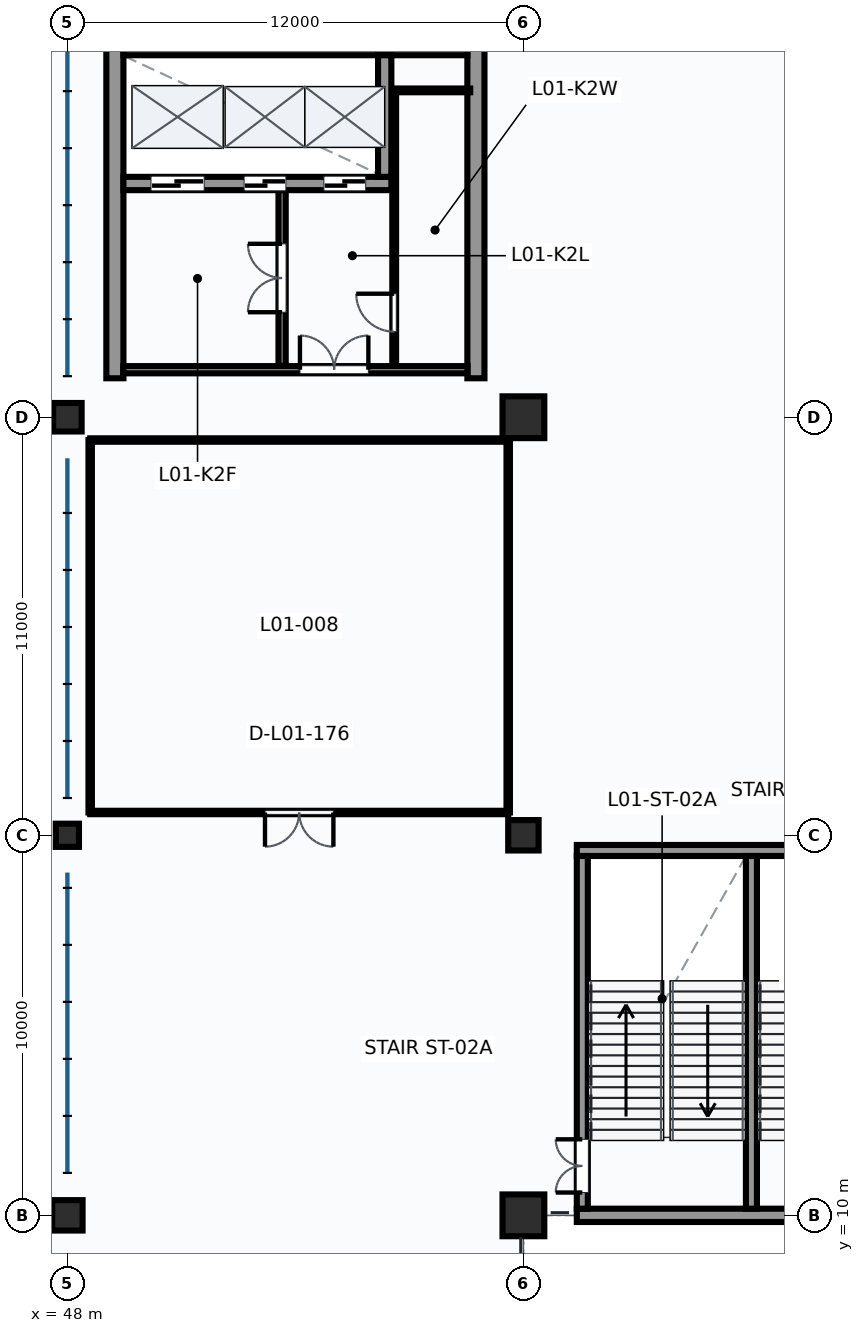
"""IFC4 building model, lengths in metres.
Left out: names, types, materials, properties, quantities, classifications, styles, units other than length and angle.
Written with IfcOpenShell. Run it as: python <this file> out.ifc"""

import sys

from ifc_helpers import new_model, si_unit, direction, frame, frame_2d, origin, origin_2d, place, context, subcontext, project, spatial, rectangle, circle, hollow_circle, extrude, element, fill, save


model = new_model("IFC4")
c1 = context("Model", 3, precision=1e-05, world=origin(), true_north=direction((0.0, 1.0)))
c2 = subcontext(c1, "Body", "Model", "MODEL_VIEW")
j1 = project(units=[si_unit("LENGTHUNIT", "METRE"), si_unit("PLANEANGLEUNIT", "RADIAN")], contexts=[c1])
p1 = place(None, origin())
s1 = spatial("IfcSite", under=j1, at=p1, CompositionType="ELEMENT")
p2 = place(p1, origin())
s2 = spatial("IfcBuilding", under=s1, at=p2, CompositionType="ELEMENT")
p3 = place(p2, frame((0.0, 0.0, 5.4)))
s3 = spatial("IfcBuildingStorey", under=s2, at=p3, CompositionType="ELEMENT", Elevation=5.4)
p4 = place(p3, frame((48.0, 10.0, 0.0), z_axis=(0.0, 0.0, 1.0), x_axis=(1.0, 0.0, 0.0)))
e1 = element("IfcColumn", 1, at=p4, inside=s3, PredefinedType="COLUMN", context=c2, shape_type="SweptSolid", body=[
    extrude(rectangle(XDim=0.8, YDim=0.8, at=origin_2d()), origin(), (0.0, 0.0, 1.0), 4.8),
])
p5 = place(p3, frame((48.0, 20.0, 0.0), z_axis=(0.0, 0.0, 1.0), x_axis=(1.0, 0.0, 0.0)))
e2 = element("IfcColumn", 2, at=p5, inside=s3, PredefinedType="COLUMN", context=c2, shape_type="SweptSolid", body=[
    extrude(hollow_circle(Radius=0.305, WallThickness=0.025, at=origin_2d()), origin(), (0.0, 0.0, 1.0), 4.8),
])
p6 = place(p3, frame((48.0, 31.0, 0.0), z_axis=(0.0, 0.0, 1.0), x_axis=(1.0, 0.0, 0.0)))
e3 = element("IfcColumn", 3, at=p6, inside=s3, PredefinedType="COLUMN", context=c2, shape_type="SweptSolid", body=[
    extrude(rectangle(XDim=0.75, YDim=0.75, at=origin_2d()), origin(), (0.0, 0.0, 1.0), 4.8),
])
p7 = place(p3, frame((60.0, 10.0, 0.0), z_axis=(0.0, 0.0, 1.0), x_axis=(1.0, 0.0, 0.0)))
e4 = element("IfcColumn", 4, at=p7, inside=s3, PredefinedType="COLUMN", context=c2, shape_type="SweptSolid", body=[
    extrude(rectangle(XDim=1.1, YDim=1.1, at=origin_2d()), origin(), (0.0, 0.0, 1.0), 4.8),
])
p8 = place(p3, frame((60.0, 20.0, 0.0), z_axis=(0.0, 0.0, 1.0), x_axis=(1.0, 0.0, 0.0)))
e5 = element("IfcColumn", 5, at=p8, inside=s3, PredefinedType="COLUMN", context=c2, shape_type="SweptSolid", body=[
    extrude(circle(Radius=0.4, at=origin_2d()), origin(), (0.0, 0.0, 1.0), 4.8),
])
p9 = place(p3, frame((60.0, 31.0, 0.0), z_axis=(0.0, 0.0, 1.0), x_axis=(1.0, 0.0, 0.0)))
e6 = element("IfcColumn", 6, at=p9, inside=s3, PredefinedType="COLUMN", context=c2, shape_type="SweptSolid", body=[
    extrude(rectangle(XDim=1.1, YDim=1.1, at=origin_2d()), origin(), (0.0, 0.0, 1.0), 4.8),
])
p10 = place(p3, frame((61.405, 10.0, 0.0), z_axis=(0.0, 0.0, 1.0), x_axis=(1.0, 0.0, 0.0)))
e7 = element("IfcWall", 7, at=p10, inside=s3, PredefinedType="SHEAR", context=c2, shape_type="SweptSolid", body=[
    extrude(rectangle(XDim=9.19, YDim=0.35, at=frame_2d((4.595, 0.0))), origin(), (0.0, 0.0, 1.0), 3.757),
])
p11 = place(p3, frame((61.405, 19.6, 0.0), z_axis=(0.0, 0.0, 1.0), x_axis=(1.0, 0.0, 0.0)))
e8 = element("IfcWall", 8, at=p11, inside=s3, PredefinedType="SHEAR", context=c2, shape_type="SweptSolid", body=[
    extrude(rectangle(XDim=9.19, YDim=0.29, at=frame_2d((4.595, 0.0))), origin(), (0.0, 0.0, 1.0), 4.8),
])
p12 = place(p3, frame((61.55, 10.175, 0.0), z_axis=(0.0, 0.0, 1.0), x_axis=(0.0, 1.0, 0.0)))
e9 = element("IfcWall", 9, at=p12, inside=s3, PredefinedType="SHEAR", context=c2, shape_type="SweptSolid", body=[
    extrude(rectangle(XDim=9.28, YDim=0.29, at=frame_2d((4.64, 0.0))), origin(), (0.0, 0.0, 1.0), 4.8),
])
p13 = place(p12, frame((0.425, 0.0, 0.0)))
e10 = element("IfcOpeningElement", 10, at=p13, cuts=e9, PredefinedType="OPENING", context=c2, shape_type="SweptSolid", body=[
    extrude(rectangle(XDim=1.4, YDim=2.2, at=frame_2d((0.7, 1.1))), frame((0.0, 0.155, 0.0), z_axis=(0.0, -1.0, 0.0), x_axis=(1.0, 0.0, 0.0)), (0.0, 0.0, 1.0), 0.31),
])
p14 = place(p3, frame((66.0, 10.175, 0.0), z_axis=(0.0, 0.0, 1.0), x_axis=(0.0, 1.0, 0.0)))
e11 = element("IfcWall", 11, at=p14, inside=s3, PredefinedType="SHEAR", context=c2, shape_type="SweptSolid", body=[
    extrude(rectangle(XDim=9.28, YDim=0.29, at=frame_2d((4.64, 0.0))), origin(), (0.0, 0.0, 1.0), 4.8),
])
for number, where, z_axis, x_axis in (
    (12, (49.25, 32.025, 0.0), (0.0, 0.0, 1.0), (0.0, 1.0, 0.0)),
    (13, (58.75, 32.025, 0.0), (0.0, 0.0, 1.0), (0.0, 1.0, 0.0)),
):
    element("IfcWall", number, at=place(p3, frame(where, z_axis=z_axis, x_axis=x_axis)), inside=s3, PredefinedType="SHEAR", context=c2, shape_type="SweptSolid", body=[
        extrude(rectangle(XDim=8.95, YDim=0.45, at=frame_2d((4.475, 0.0))), origin(), (0.0, 0.0, 1.0), 4.8),
    ])
p15 = place(p3, frame((49.475, 40.75, 0.0), z_axis=(0.0, 0.0, 1.0), x_axis=(1.0, 0.0, 0.0)))
e14 = element("IfcWall", 14, at=p15, inside=s3, PredefinedType="SHEAR", context=c2, shape_type="SweptSolid", body=[
    extrude(rectangle(XDim=9.05, YDim=0.45, at=frame_2d((4.525, 0.0))), origin(), (0.0, 0.0, 1.0), 4.8),
])
p16 = place(p3, frame((49.475, 37.15, 0.0), z_axis=(0.0, 0.0, 1.0), x_axis=(1.0, 0.0, 0.0)))
e15 = element("IfcWall", 15, at=p16, inside=s3, PredefinedType="SHEAR", context=c2, shape_type="SweptSolid", body=[
    extrude(rectangle(XDim=7.05, YDim=0.35, at=frame_2d((3.525, 0.0))), origin(), (0.0, 0.0, 1.0), 4.8),
])
p17 = place(p16, frame((0.725, 0.0, 0.0)))
e16 = element("IfcOpeningElement", 16, at=p17, cuts=e15, PredefinedType="OPENING", context=c2, shape_type="SweptSolid", body=[
    extrude(rectangle(XDim=1.4, YDim=2.3, at=frame_2d((0.7, 1.15))), frame((0.0, 0.185, 0.0), z_axis=(0.0, -1.0, 0.0), x_axis=(1.0, 0.0, 0.0)), (0.0, 0.0, 1.0), 0.37),
])
p18 = place(p16, frame((3.175, 0.0, 0.0)))
e17 = element("IfcOpeningElement", 17, at=p18, cuts=e15, PredefinedType="OPENING", context=c2, shape_type="SweptSolid", body=[
    extrude(rectangle(XDim=1.1, YDim=2.2, at=frame_2d((0.55, 1.1))), frame((0.0, 0.185, 0.0), z_axis=(0.0, -1.0, 0.0), x_axis=(1.0, 0.0, 0.0)), (0.0, 0.0, 1.0), 0.37),
])
p19 = place(p16, frame((5.275, 0.0, 0.0)))
e18 = element("IfcOpeningElement", 18, at=p19, cuts=e15, PredefinedType="OPENING", context=c2, shape_type="SweptSolid", body=[
    extrude(rectangle(XDim=1.1, YDim=2.2, at=frame_2d((0.55, 1.1))), frame((0.0, 0.185, 0.0), z_axis=(0.0, -1.0, 0.0), x_axis=(1.0, 0.0, 0.0)), (0.0, 0.0, 1.0), 0.37),
])
p20 = place(p3, frame((56.35, 37.325, 0.0), z_axis=(0.0, 0.0, 1.0), x_axis=(0.0, 1.0, 0.0)))
e19 = element("IfcWall", 19, at=p20, inside=s3, PredefinedType="SHEAR", context=c2, shape_type="SweptSolid", body=[
    extrude(rectangle(XDim=3.2, YDim=0.35, at=frame_2d((1.6, 0.0))), origin(), (0.0, 0.0, 1.0), 4.8),
])
p21 = place(p3, frame((49.47, 32.25, 0.0), z_axis=(0.0, 0.0, 1.0), x_axis=(1.0, 0.0, 0.0)))
e20 = element("IfcWall", 20, at=p21, inside=s3, PredefinedType="PARTITIONING", context=c2, shape_type="SweptSolid", body=[
    extrude(rectangle(XDim=9.06, YDim=0.19, at=frame_2d((4.53, 0.0))), origin(), (0.0, 0.0, 1.0), 4.47),
])
p22 = place(p21, frame((4.65, 0.0, 0.0)))
e21 = element("IfcOpeningElement", 21, at=p22, cuts=e20, PredefinedType="OPENING", context=c2, shape_type="SweptSolid", body=[
    extrude(rectangle(XDim=1.8, YDim=2.3, at=frame_2d((0.9, 1.15))), frame((0.0, 0.105, 0.0), z_axis=(0.0, -1.0, 0.0), x_axis=(1.0, 0.0, 0.0)), (0.0, 0.0, 1.0), 0.21),
])
p23 = place(p3, frame((53.65, 32.35, 0.0), z_axis=(0.0, 0.0, 1.0), x_axis=(0.0, 1.0, 0.0)))
e22 = element("IfcWall", 22, at=p23, inside=s3, PredefinedType="PARTITIONING", context=c2, shape_type="SweptSolid", body=[
    extrude(rectangle(XDim=4.625, YDim=0.19, at=frame_2d((2.312, 0.0))), origin(), (0.0, 0.0, 1.0), 4.47),
])
p24 = place(p23, frame((1.413, 0.0, 0.0)))
e23 = element("IfcOpeningElement", 23, at=p24, cuts=e22, PredefinedType="OPENING", context=c2, shape_type="SweptSolid", body=[
    extrude(rectangle(XDim=1.8, YDim=2.2, at=frame_2d((0.9, 1.1))), frame((0.0, 0.105, 0.0), z_axis=(0.0, -1.0, 0.0), x_axis=(1.0, 0.0, 0.0)), (0.0, 0.0, 1.0), 0.21),
])
p25 = place(p3, frame((56.6, 32.35, 0.0), z_axis=(0.0, 0.0, 1.0), x_axis=(0.0, 1.0, 0.0)))
e24 = element("IfcWall", 24, at=p25, inside=s3, PredefinedType="PARTITIONING", context=c2, shape_type="SweptSolid", body=[
    extrude(rectangle(XDim=7.25, YDim=0.1, at=frame_2d((3.625, 0.0))), origin(), (0.0, 0.0, 1.0), 4.47),
])
p26 = place(p25, frame((0.9, 0.0, 0.0)))
e25 = element("IfcOpeningElement", 25, at=p26, cuts=e24, PredefinedType="OPENING", context=c2, shape_type="SweptSolid", body=[
    extrude(rectangle(XDim=1.0, YDim=2.1, at=frame_2d((0.5, 1.05))), frame((0.0, 0.06, 0.0), z_axis=(0.0, -1.0, 0.0), x_axis=(1.0, 0.0, 0.0)), (0.0, 0.0, 1.0), 0.12),
])
p27 = place(p3, frame((56.6, 39.6, 0.0), z_axis=(0.0, 0.0, 1.0), x_axis=(1.0, 0.0, 0.0)))
e26 = element("IfcWall", 26, at=p27, inside=s3, PredefinedType="PARTITIONING", context=c2, shape_type="SweptSolid", body=[
    extrude(rectangle(XDim=2.0, YDim=0.1, at=frame_2d((1.0, 0.0))), origin(), (0.0, 0.0, 1.0), 4.47),
])
p28 = place(p3, frame((59.6, 30.4, 0.0), z_axis=(0.0, 0.0, 1.0), x_axis=(0.0, -1.0, 0.0)))
e27 = element("IfcWall", 27, at=p28, inside=s3, PredefinedType="PARTITIONING", context=c2, shape_type="SweptSolid", body=[
    extrude(rectangle(XDim=9.8, YDim=0.09, at=frame_2d((4.9, 0.0))), origin(), (0.0, 0.0, 1.0), 3.99),
])
p29 = place(p3, frame((59.6, 20.6, 0.0), z_axis=(0.0, 0.0, 1.0), x_axis=(-1.0, 0.0, 0.0)))
e28 = element("IfcWall", 28, at=p29, inside=s3, PredefinedType="PARTITIONING", context=c2, shape_type="SweptSolid", body=[
    extrude(rectangle(XDim=11.0, YDim=0.09, at=frame_2d((5.5, 0.0))), origin(), (0.0, 0.0, 1.0), 4.47),
])
p30 = place(p29, frame((4.6, 0.0, 0.0)))
e29 = element("IfcOpeningElement", 29, at=p30, cuts=e28, PredefinedType="OPENING", context=c2, shape_type="SweptSolid", body=[
    extrude(rectangle(XDim=1.8, YDim=2.3, at=frame_2d((0.9, 1.15))), frame((0.0, 0.055, 0.0), z_axis=(0.0, -1.0, 0.0), x_axis=(1.0, 0.0, 0.0)), (0.0, 0.0, 1.0), 0.11),
])
p31 = place(p3, frame((48.6, 20.6, 0.0), z_axis=(0.0, 0.0, 1.0), x_axis=(0.0, 1.0, 0.0)))
e30 = element("IfcWall", 30, at=p31, inside=s3, PredefinedType="PARTITIONING", context=c2, shape_type="SweptSolid", body=[
    extrude(rectangle(XDim=9.8, YDim=0.09, at=frame_2d((4.9, 0.0))), origin(), (0.0, 0.0, 1.0), 3.99),
])
p32 = place(p3, frame((48.6, 30.4, 0.0), z_axis=(0.0, 0.0, 1.0), x_axis=(1.0, 0.0, 0.0)))
e31 = element("IfcWall", 31, at=p32, inside=s3, PredefinedType="PARTITIONING", context=c2, shape_type="SweptSolid", body=[
    extrude(rectangle(XDim=11.0, YDim=0.09, at=frame_2d((5.5, 0.0))), origin(), (0.0, 0.0, 1.0), 4.47),
])
p33 = place(p13, frame((1.4, 0.0, 0.0), z_axis=(0.0, 0.0, 1.0), x_axis=(-1.0, 0.0, 0.0)))
e32 = element("IfcDoor", 32, at=p33, inside=s3, OperationType="DOUBLE_DOOR_SINGLE_SWING", PredefinedType="DOOR", context=c2, shape_type="SweptSolid", body=[
    extrude(rectangle(XDim=1.4, YDim=2.2, at=frame_2d((0.7, 1.1))), frame((0.0, 0.025, 0.0), z_axis=(0.0, -1.0, 0.0), x_axis=(1.0, 0.0, 0.0)), (0.0, 0.0, 1.0), 0.05),
])
fill(e10, e32)
p34 = place(p17, origin())
e33 = element("IfcDoor", 33, at=p34, inside=s3, OperationType="SLIDING_TO_LEFT", PredefinedType="DOOR", context=c2, shape_type="SweptSolid", body=[
    extrude(rectangle(XDim=1.4, YDim=2.3, at=frame_2d((0.7, 1.15))), frame((0.0, 0.025, 0.0), z_axis=(0.0, -1.0, 0.0), x_axis=(1.0, 0.0, 0.0)), (0.0, 0.0, 1.0), 0.05),
])
fill(e16, e33)
p35 = place(p18, origin())
e34 = element("IfcDoor", 34, at=p35, inside=s3, OperationType="SLIDING_TO_LEFT", PredefinedType="DOOR", context=c2, shape_type="SweptSolid", body=[
    extrude(rectangle(XDim=1.1, YDim=2.2, at=frame_2d((0.55, 1.1))), frame((0.0, 0.025, 0.0), z_axis=(0.0, -1.0, 0.0), x_axis=(1.0, 0.0, 0.0)), (0.0, 0.0, 1.0), 0.05),
])
fill(e17, e34)
p36 = place(p19, origin())
e35 = element("IfcDoor", 35, at=p36, inside=s3, OperationType="SLIDING_TO_LEFT", PredefinedType="DOOR", context=c2, shape_type="SweptSolid", body=[
    extrude(rectangle(XDim=1.1, YDim=2.2, at=frame_2d((0.55, 1.1))), frame((0.0, 0.025, 0.0), z_axis=(0.0, -1.0, 0.0), x_axis=(1.0, 0.0, 0.0)), (0.0, 0.0, 1.0), 0.05),
])
fill(e18, e35)
p37 = place(p22, origin())
e36 = element("IfcDoor", 36, at=p37, inside=s3, OperationType="DOUBLE_DOOR_SINGLE_SWING", PredefinedType="DOOR", context=c2, shape_type="SweptSolid", body=[
    extrude(rectangle(XDim=1.8, YDim=2.3, at=frame_2d((0.9, 1.15))), frame((0.0, 0.025, 0.0), z_axis=(0.0, -1.0, 0.0), x_axis=(1.0, 0.0, 0.0)), (0.0, 0.0, 1.0), 0.05),
])
fill(e21, e36)
p38 = place(p24, origin())
e37 = element("IfcDoor", 37, at=p38, inside=s3, OperationType="DOUBLE_DOOR_SINGLE_SWING", PredefinedType="DOOR", context=c2, shape_type="SweptSolid", body=[
    extrude(rectangle(XDim=1.8, YDim=2.2, at=frame_2d((0.9, 1.1))), frame((0.0, 0.025, 0.0), z_axis=(0.0, -1.0, 0.0), x_axis=(1.0, 0.0, 0.0)), (0.0, 0.0, 1.0), 0.05),
])
fill(e23, e37)
p39 = place(p26, origin())
e38 = element("IfcDoor", 38, at=p39, inside=s3, OperationType="SINGLE_SWING_RIGHT", PredefinedType="DOOR", context=c2, shape_type="SweptSolid", body=[
    extrude(rectangle(XDim=1.0, YDim=2.1, at=frame_2d((0.5, 1.05))), frame((0.0, 0.025, 0.0), z_axis=(0.0, -1.0, 0.0), x_axis=(1.0, 0.0, 0.0)), (0.0, 0.0, 1.0), 0.05),
])
fill(e25, e38)
p40 = place(p30, origin())
e39 = element("IfcDoor", 39, at=p40, inside=s3, OperationType="DOUBLE_DOOR_SINGLE_SWING", PredefinedType="DOOR", context=c2, shape_type="SweptSolid", body=[
    extrude(rectangle(XDim=1.8, YDim=2.3, at=frame_2d((0.9, 1.15))), frame((0.0, 0.025, 0.0), z_axis=(0.0, -1.0, 0.0), x_axis=(1.0, 0.0, 0.0)), (0.0, 0.0, 1.0), 0.05),
])
fill(e29, e39)
save(model, sys.argv[1])
